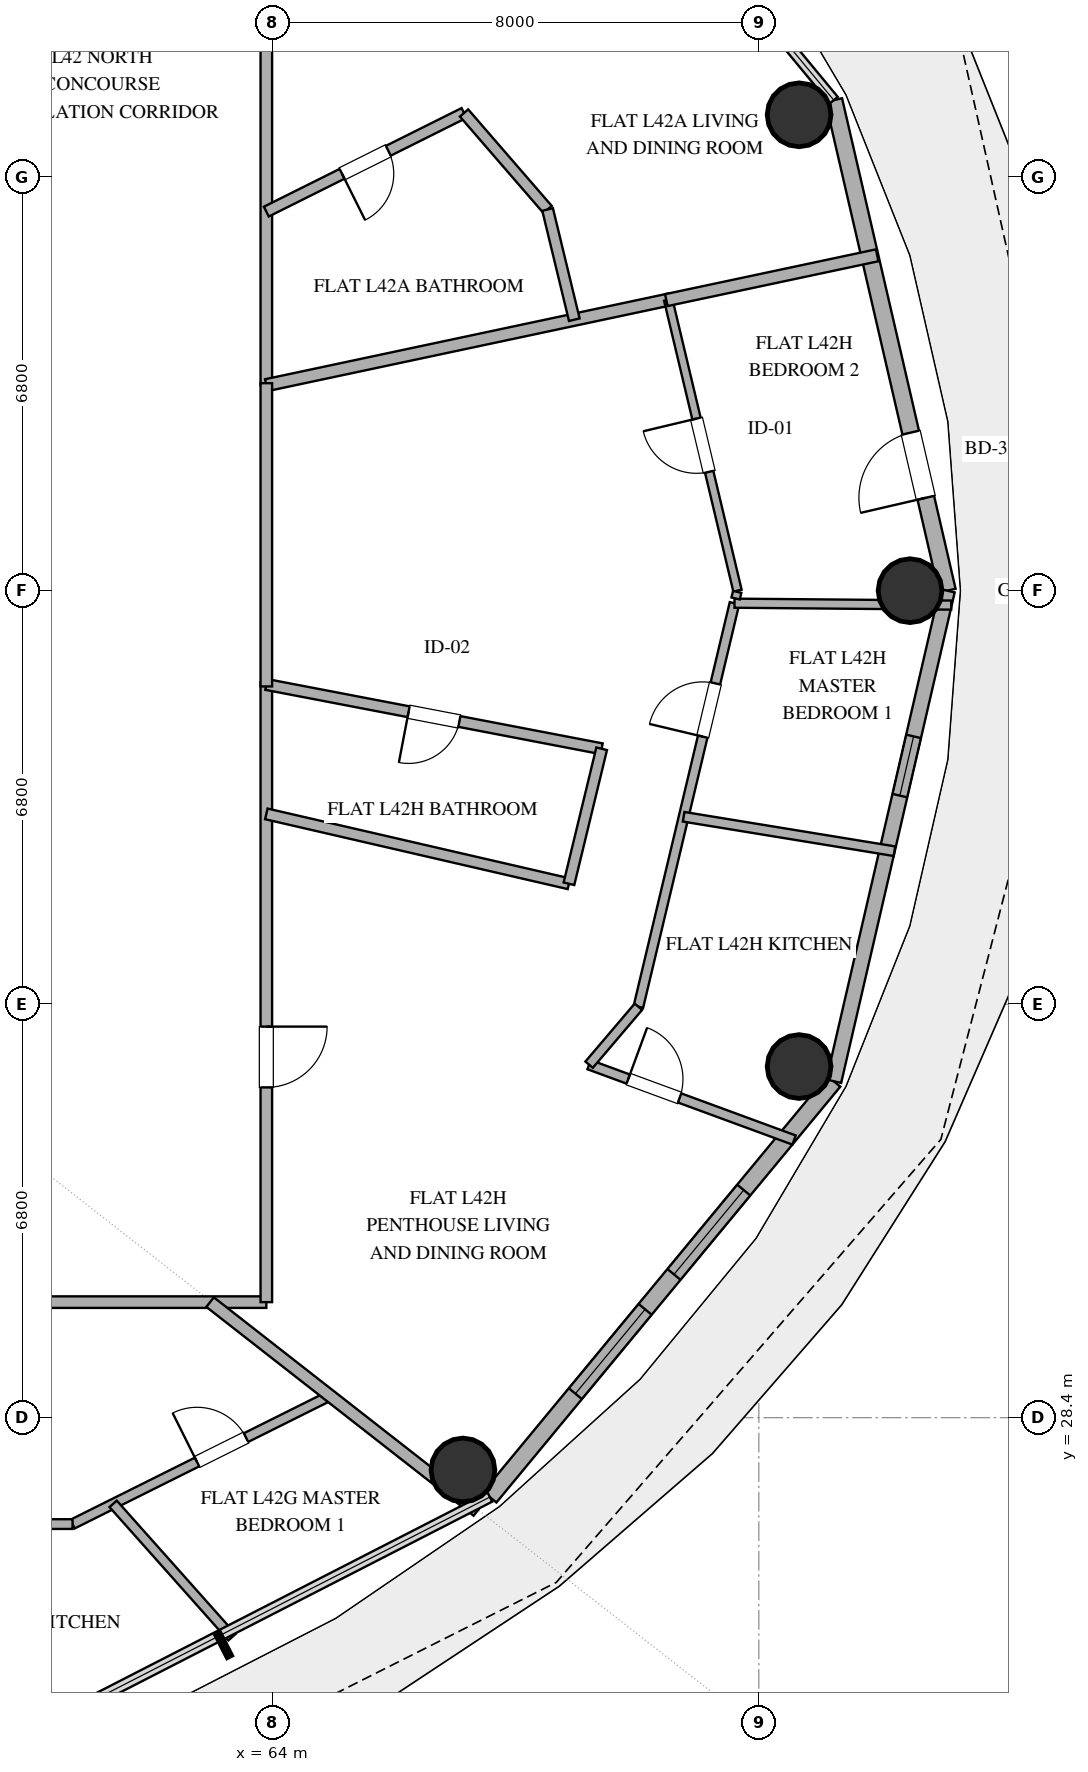
"""IFC4 building model, lengths in metres.
Left out: names, types, materials, properties, quantities, classifications, styles, units other than length and angle.
Written with IfcOpenShell. Run it as: python <this file> out.ifc"""

import sys

from ifc_helpers import new_model, si_unit, direction, frame, frame_2d, origin, origin_2d, place, context, subcontext, project, spatial, rectangle, hollow_circle, extrude, element, fill, save


model = new_model("IFC4")
c1 = context("Model", 3, precision=1e-05, world=origin(), true_north=direction((0.0, 1.0)))
c2 = subcontext(c1, "Body", "Model", "MODEL_VIEW")
j1 = project(units=[si_unit("LENGTHUNIT", "METRE"), si_unit("PLANEANGLEUNIT", "RADIAN")], contexts=[c1])
p1 = place(None, origin())
s1 = spatial("IfcSite", under=j1, at=p1, CompositionType="ELEMENT")
p2 = place(p1, origin())
s2 = spatial("IfcBuilding", under=s1, at=p2, CompositionType="ELEMENT")
p3 = place(p2, frame((0.0, 0.0, 168.6)))
s3 = spatial("IfcBuildingStorey", under=s2, at=p3, CompositionType="ELEMENT", Elevation=168.6)
for number, where, z_axis, x_axis in (
    (1, (74.487, 42.0, 0.0), (0.0, 0.0, 1.0), (1.0, 0.0, 0.0)),
    (2, (72.662, 49.826, 0.0), (0.0, 0.0, 1.0), (1.0, 0.0, 0.0)),
    (3, (67.134, 27.54, 0.0), (0.0, 0.0, 1.0), (1.0, 0.0, 0.0)),
    (4, (72.662, 34.174, 0.0), (0.0, 0.0, 1.0), (1.0, 0.0, 0.0)),
):
    element("IfcColumn", number, at=place(p3, frame(where, z_axis=z_axis, x_axis=x_axis)), inside=s3, PredefinedType="COLUMN", context=c2, shape_type="SweptSolid", body=[
        extrude(hollow_circle(Radius=0.525, WallThickness=0.028, at=origin_2d()), origin(), (0.0, 0.0, 1.0), 3.38),
    ])
p4 = place(p3, frame((75.099, 42.0, 0.0), z_axis=(0.0, 0.0, 1.0), x_axis=(-0.225473184558, 0.974249374157, 0.0)))
e5 = element("IfcWall", 5, at=p4, inside=s3, PredefinedType="SOLIDWALL", context=c2, shape_type="SweptSolid", body=[
    extrude(rectangle(XDim=8.28, YDim=0.28, at=frame_2d((4.14, 0.0))), origin(), (0.0, 0.0, 1.0), 3.38),
])
p5 = place(p4, frame((1.568, 0.0, 0.0)))
e6 = element("IfcOpeningElement", 6, at=p5, cuts=e5, PredefinedType="OPENING", context=c2, shape_type="SweptSolid", body=[
    extrude(rectangle(XDim=1.1, YDim=2.25, at=frame_2d((0.55, 1.125))), frame((0.0, 0.15, 0.0), z_axis=(0.0, -1.0, 0.0), x_axis=(1.0, 0.0, 0.0)), (0.0, 0.0, 1.0), 0.3),
])
p6 = place(p3, frame((67.576, 27.094, 0.0), z_axis=(0.0, 0.0, 1.0), x_axis=(0.637333477683, 0.770588111915, 0.0)))
e7 = element("IfcWall", 7, at=p6, inside=s3, PredefinedType="SOLIDWALL", context=c2, shape_type="SweptSolid", body=[
    extrude(rectangle(XDim=8.875, YDim=0.28, at=frame_2d((4.438, 0.0))), origin(), (0.0, 0.0, 1.0), 3.38),
])
p7 = place(p6, frame((2.207, 0.0, 0.85)))
e8 = element("IfcOpeningElement", 8, at=p7, cuts=e7, PredefinedType="OPENING", context=c2, shape_type="SweptSolid", body=[
    extrude(rectangle(XDim=1.8, YDim=2.2, at=frame_2d((0.9, 1.1))), frame((0.0, 0.15, 0.0), z_axis=(0.0, -1.0, 0.0), x_axis=(1.0, 0.0, 0.0)), (0.0, 0.0, 1.0), 0.3),
])
p8 = place(p6, frame((4.752, 0.0, 0.85)))
e9 = element("IfcOpeningElement", 9, at=p8, cuts=e7, PredefinedType="OPENING", context=c2, shape_type="SweptSolid", body=[
    extrude(rectangle(XDim=1.8, YDim=2.2, at=frame_2d((0.9, 1.1))), frame((0.0, 0.15, 0.0), z_axis=(0.0, -1.0, 0.0), x_axis=(1.0, 0.0, 0.0)), (0.0, 0.0, 1.0), 0.3),
])
p9 = place(p3, frame((73.232, 33.933, 0.0), z_axis=(0.0, 0.0, 1.0), x_axis=(0.225473184558, 0.974249374157, 0.0)))
e10 = element("IfcWall", 10, at=p9, inside=s3, PredefinedType="SOLIDWALL", context=c2, shape_type="SweptSolid", body=[
    extrude(rectangle(XDim=8.28, YDim=0.25, at=frame_2d((4.14, 0.0))), origin(), (0.0, 0.0, 1.0), 3.38),
])
p10 = place(p9, frame((4.821, 0.0, 0.35)))
e11 = element("IfcOpeningElement", 11, at=p10, cuts=e10, PredefinedType="OPENING", context=c2, shape_type="SweptSolid", body=[
    extrude(rectangle(XDim=1.0, YDim=1.05, at=frame_2d((0.5, 0.525))), frame((0.0, 0.135, 0.0), z_axis=(0.0, -1.0, 0.0), x_axis=(1.0, 0.0, 0.0)), (0.0, 0.0, 1.0), 0.27),
])
p11 = place(p3, frame((63.9, 30.3, 0.0), z_axis=(0.0, 0.0, 1.0), x_axis=(-1.0, 0.0, 0.0)))
e12 = element("IfcWall", 12, at=p11, inside=s3, PredefinedType="PARTITIONING", context=c2, shape_type="SweptSolid", body=[
    extrude(rectangle(XDim=15.625, YDim=0.19, at=frame_2d((7.813, 0.0))), origin(), (0.0, 0.0, 1.0), 2.74),
])
p12 = place(p11, frame((6.137, 0.0, 0.0)))
e13 = element("IfcOpeningElement", 13, at=p12, cuts=e12, PredefinedType="OPENING", context=c2, shape_type="SweptSolid", body=[
    extrude(rectangle(XDim=1.0, YDim=2.2, at=frame_2d((0.5, 1.1))), frame((0.0, 0.105, 0.0), z_axis=(0.0, -1.0, 0.0), x_axis=(1.0, 0.0, 0.0)), (0.0, 0.0, 1.0), 0.21),
])
p13 = place(p3, frame((63.9, 40.49, 0.0), z_axis=(0.0, 0.0, 1.0), x_axis=(0.0, -1.0, 0.0)))
e14 = element("IfcWall", 14, at=p13, inside=s3, PredefinedType="PARTITIONING", context=c2, shape_type="SweptSolid", body=[
    extrude(rectangle(XDim=10.19, YDim=0.19, at=frame_2d((5.095, 0.0))), origin(), (0.0, 0.0, 1.0), 2.74),
])
p14 = place(p13, frame((5.659, 0.0, 0.0)))
e15 = element("IfcOpeningElement", 15, at=p14, cuts=e14, PredefinedType="OPENING", context=c2, shape_type="SweptSolid", body=[
    extrude(rectangle(XDim=1.0, YDim=2.2, at=frame_2d((0.5, 1.1))), frame((0.0, 0.105, 0.0), z_axis=(0.0, -1.0, 0.0), x_axis=(1.0, 0.0, 0.0)), (0.0, 0.0, 1.0), 0.21),
])
p15 = place(p3, frame((69.415, 39.4, 0.0), z_axis=(0.0, 0.0, 1.0), x_axis=(-0.98210492306, 0.188334596135, 0.0)))
e16 = element("IfcWall", 16, at=p15, inside=s3, PredefinedType="PLUMBINGWALL", context=c2, shape_type="SweptSolid", body=[
    extrude(rectangle(XDim=5.616, YDim=0.18, at=frame_2d((2.808, 0.0))), origin(), (0.0, 0.0, 1.0), 2.74),
])
p16 = place(p15, frame((2.383, 0.0, 0.0)))
e17 = element("IfcOpeningElement", 17, at=p16, cuts=e16, PredefinedType="OPENING", context=c2, shape_type="SweptSolid", body=[
    extrude(rectangle(XDim=0.85, YDim=2.1, at=frame_2d((0.425, 1.05))), frame((0.0, 0.1, 0.0), z_axis=(0.0, -1.0, 0.0), x_axis=(1.0, 0.0, 0.0)), (0.0, 0.0, 1.0), 0.2),
])
p17 = place(p3, frame((63.9, 53.7, 0.0), z_axis=(0.0, 0.0, 1.0), x_axis=(0.0, -1.0, 0.0)))
e18 = element("IfcWall", 18, at=p17, inside=s3, PredefinedType="PARTITIONING", context=c2, shape_type="SweptSolid", body=[
    extrude(rectangle(XDim=8.32, YDim=0.19, at=frame_2d((4.16, 0.0))), origin(), (0.0, 0.0, 1.0), 2.74),
])
p18 = place(p3, frame((63.9, 45.38, 0.0), z_axis=(0.0, 0.0, 1.0), x_axis=(0.978145779981, 0.207920256603, 0.0)))
e19 = element("IfcWall", 19, at=p18, inside=s3, PredefinedType="PARTITIONING", context=c2, shape_type="SweptSolid", body=[
    extrude(rectangle(XDim=6.789, YDim=0.2, at=frame_2d((3.395, 0.0))), origin(), (0.0, 0.0, 1.0), 2.74),
])
p19 = place(p3, frame((63.9, 38.329, 0.0), z_axis=(0.0, 0.0, 1.0), x_axis=(0.974377500084, -0.224918846098, 0.0)))
e20 = element("IfcWall", 20, at=p19, inside=s3, PredefinedType="PLUMBINGWALL", context=c2, shape_type="SweptSolid", body=[
    extrude(rectangle(XDim=5.108, YDim=0.18, at=frame_2d((2.554, 0.0))), origin(), (0.0, 0.0, 1.0), 2.74),
])
p20 = place(p3, frame((63.9, 45.412, 0.0), z_axis=(0.0, 0.0, 1.0), x_axis=(0.0, -1.0, 0.0)))
e21 = element("IfcWall", 21, at=p20, inside=s3, PredefinedType="PARTITIONING", context=c2, shape_type="SweptSolid", body=[
    extrude(rectangle(XDim=4.987, YDim=0.19, at=frame_2d((2.494, 0.0))), origin(), (0.0, 0.0, 1.0), 2.74),
])
p21 = place(p3, frame((71.649, 42.0, 0.0), z_axis=(0.0, 0.0, 1.0), x_axis=(-0.231622764326, 0.972805682059, 0.0)))
e22 = element("IfcWall", 22, at=p21, inside=s3, PredefinedType="PARTITIONING", context=c2, shape_type="SweptSolid", body=[
    extrude(rectangle(XDim=4.918, YDim=0.14, at=frame_2d((2.459, 0.0))), origin(), (0.0, 0.0, 1.0), 2.74),
])
p22 = place(p21, frame((2.009, 0.0, 0.0)))
e23 = element("IfcOpeningElement", 23, at=p22, cuts=e22, PredefinedType="OPENING", context=c2, shape_type="SweptSolid", body=[
    extrude(rectangle(XDim=0.9, YDim=2.1, at=frame_2d((0.45, 1.05))), frame((0.0, 0.08, 0.0), z_axis=(0.0, -1.0, 0.0), x_axis=(1.0, 0.0, 0.0)), (0.0, 0.0, 1.0), 0.16),
])
p23 = place(p3, frame((60.713, 26.65, 0.0), z_axis=(0.0, 0.0, 1.0), x_axis=(0.894932492822, 0.446201561283, 0.0)))
e24 = element("IfcWall", 24, at=p23, inside=s3, PredefinedType="PLUMBINGWALL", context=c2, shape_type="SweptSolid", body=[
    extrude(rectangle(XDim=4.729, YDim=0.16, at=frame_2d((2.365, 0.0))), origin(), (0.0, 0.0, 1.0), 2.74),
])
p24 = place(p23, frame((2.288, 0.0, 0.0)))
e25 = element("IfcOpeningElement", 25, at=p24, cuts=e24, PredefinedType="OPENING", context=c2, shape_type="SweptSolid", body=[
    extrude(rectangle(XDim=0.9, YDim=2.1, at=frame_2d((0.45, 1.05))), frame((0.0, 0.09, 0.0), z_axis=(0.0, -1.0, 0.0), x_axis=(1.0, 0.0, 0.0)), (0.0, 0.0, 1.0), 0.18),
])
p25 = place(p3, frame((67.152, 49.856, 0.0), z_axis=(0.0, 0.0, 1.0), x_axis=(-0.894843352961, -0.446380301605, 0.0)))
e26 = element("IfcWall", 26, at=p25, inside=s3, PredefinedType="PLUMBINGWALL", context=c2, shape_type="SweptSolid", body=[
    extrude(rectangle(XDim=3.634, YDim=0.18, at=frame_2d((1.817, 0.0))), origin(), (0.0, 0.0, 1.0), 2.74),
])
p26 = place(p25, frame((1.392, 0.0, 0.0)))
e27 = element("IfcOpeningElement", 27, at=p26, cuts=e26, PredefinedType="OPENING", context=c2, shape_type="SweptSolid", body=[
    extrude(rectangle(XDim=0.85, YDim=2.1, at=frame_2d((0.425, 1.05))), frame((0.0, 0.1, 0.0), z_axis=(0.0, -1.0, 0.0), x_axis=(1.0, 0.0, 0.0)), (0.0, 0.0, 1.0), 0.2),
])
p27 = place(p3, frame((70.019, 35.158, 0.0), z_axis=(0.0, 0.0, 1.0), x_axis=(0.231657621012, 0.972797382103, 0.0)))
e28 = element("IfcWall", 28, at=p27, inside=s3, PredefinedType="PLUMBINGWALL", context=c2, shape_type="SweptSolid", body=[
    extrude(rectangle(XDim=6.822, YDim=0.16, at=frame_2d((3.411, 0.0))), origin(), (0.0, 0.0, 1.0), 2.74),
])
p28 = place(p27, frame((4.567, 0.0, 0.0)))
e29 = element("IfcOpeningElement", 29, at=p28, cuts=e28, PredefinedType="OPENING", context=c2, shape_type="SweptSolid", body=[
    extrude(rectangle(XDim=0.9, YDim=2.1, at=frame_2d((0.45, 1.05))), frame((0.0, 0.09, 0.0), z_axis=(0.0, -1.0, 0.0), x_axis=(1.0, 0.0, 0.0)), (0.0, 0.0, 1.0), 0.18),
])
p29 = place(p3, frame((69.208, 34.205, 0.0), z_axis=(0.0, 0.0, 1.0), x_axis=(0.938602834346, -0.344999593272, 0.0)))
e30 = element("IfcWall", 30, at=p29, inside=s3, PredefinedType="PLUMBINGWALL", context=c2, shape_type="SweptSolid", body=[
    extrude(rectangle(XDim=3.591, YDim=0.16, at=frame_2d((1.796, 0.0))), origin(), (0.0, 0.0, 1.0), 2.74),
])
p30 = place(p29, frame((0.686, 0.0, 0.0)))
e31 = element("IfcOpeningElement", 31, at=p30, cuts=e30, PredefinedType="OPENING", context=c2, shape_type="SweptSolid", body=[
    extrude(rectangle(XDim=0.9, YDim=2.1, at=frame_2d((0.45, 1.05))), frame((0.0, 0.09, 0.0), z_axis=(0.0, -1.0, 0.0), x_axis=(1.0, 0.0, 0.0)), (0.0, 0.0, 1.0), 0.18),
])
p31 = place(p3, frame((75.165, 41.763, 0.0), z_axis=(0.0, 0.0, 1.0), x_axis=(-0.999962184605, 0.00869651424, 0.0)))
e32 = element("IfcWall", 32, at=p31, inside=s3, PredefinedType="PARTITIONING", context=c2, shape_type="SweptSolid", body=[
    extrude(rectangle(XDim=3.565, YDim=0.15, at=frame_2d((1.783, 0.0))), origin(), (0.0, 0.0, 1.0), 2.74),
])
p32 = place(p3, frame((73.946, 47.515, 0.0), z_axis=(0.0, 0.0, 1.0), x_axis=(-0.978135742848, -0.207967469966, 0.0)))
e33 = element("IfcWall", 33, at=p32, inside=s3, PredefinedType="PARTITIONING", context=c2, shape_type="SweptSolid", body=[
    extrude(rectangle(XDim=3.545, YDim=0.2, at=frame_2d((1.773, 0.0))), origin(), (0.0, 0.0, 1.0), 2.74),
])
p33 = place(p3, frame((74.231, 37.716, 0.0), z_axis=(0.0, 0.0, 1.0), x_axis=(-0.986918442879, 0.161220306117, 0.0)))
e34 = element("IfcWall", 34, at=p33, inside=s3, PredefinedType="PLUMBINGWALL", context=c2, shape_type="SweptSolid", body=[
    extrude(rectangle(XDim=3.513, YDim=0.16, at=frame_2d((1.757, 0.0))), origin(), (0.0, 0.0, 1.0), 2.74),
])
p34 = place(p3, frame((67.37, 26.866, 0.0), z_axis=(0.0, 0.0, 1.0), x_axis=(-0.788004464355, 0.615669525117, 0.0)))
e35 = element("IfcWall", 35, at=p34, inside=s3, PredefinedType="PARTITIONING", context=c2, shape_type="SweptSolid", body=[
    extrude(rectangle(XDim=5.577, YDim=0.2, at=frame_2d((2.789, 0.0))), origin(), (0.0, 0.0, 1.0), 2.74),
])
p35 = place(p3, frame((63.335, 24.79, 0.0), z_axis=(0.0, 0.0, 1.0), x_axis=(-0.665255741341, 0.746615562799, 0.0)))
e36 = element("IfcWall", 36, at=p35, inside=s3, PredefinedType="PLUMBINGWALL", context=c2, shape_type="SweptSolid", body=[
    extrude(rectangle(XDim=2.938, YDim=0.16, at=frame_2d((1.469, 0.0))), origin(), (0.0, 0.0, 1.0), 2.74),
])
p36 = place(p3, frame((68.877, 37.18, 0.0), z_axis=(0.0, 0.0, 1.0), x_axis=(0.235462364404, 0.971883467783, 0.0)))
e37 = element("IfcWall", 37, at=p36, inside=s3, PredefinedType="PLUMBINGWALL", context=c2, shape_type="SweptSolid", body=[
    extrude(rectangle(XDim=2.284, YDim=0.18, at=frame_2d((1.142, 0.0))), origin(), (0.0, 0.0, 1.0), 2.74),
])
p37 = place(p3, frame((68.526, 48.268, 0.0), z_axis=(0.0, 0.0, 1.0), x_axis=(-0.654594060889, 0.755980565524, 0.0)))
e38 = element("IfcWall", 38, at=p37, inside=s3, PredefinedType="PLUMBINGWALL", context=c2, shape_type="SweptSolid", body=[
    extrude(rectangle(XDim=2.1, YDim=0.18, at=frame_2d((1.05, 0.0))), origin(), (0.0, 0.0, 1.0), 2.74),
])
p38 = place(p3, frame((68.965, 46.456, 0.0), z_axis=(0.0, 0.0, 1.0), x_axis=(-0.235442613623, 0.971888252676, 0.0)))
e39 = element("IfcWall", 39, at=p38, inside=s3, PredefinedType="PLUMBINGWALL", context=c2, shape_type="SweptSolid", body=[
    extrude(rectangle(XDim=1.865, YDim=0.18, at=frame_2d((0.932, 0.0))), origin(), (0.0, 0.0, 1.0), 2.74),
])
p39 = place(p3, frame((70.02, 35.158, 0.0), z_axis=(0.0, 0.0, 1.0), x_axis=(-0.648152333742, -0.761510703972, 0.0)))
e40 = element("IfcWall", 40, at=p39, inside=s3, PredefinedType="PLUMBINGWALL", context=c2, shape_type="SweptSolid", body=[
    extrude(rectangle(XDim=1.251, YDim=0.16, at=frame_2d((0.625, 0.0))), origin(), (0.0, 0.0, 1.0), 2.74),
])
p40 = place(p3, frame((60.713, 26.65, 0.0), z_axis=(0.0, 0.0, 1.0), x_axis=(-1.0, 0.0, 0.0)))
e41 = element("IfcWall", 41, at=p40, inside=s3, PredefinedType="PLUMBINGWALL", context=c2, shape_type="SweptSolid", body=[
    extrude(rectangle(XDim=1.062, YDim=0.16, at=frame_2d((0.531, 0.0))), origin(), (0.0, 0.0, 1.0), 2.74),
])
p41 = place(p3, frame((71.618, 41.872, 0.0), z_axis=(0.0, 0.0, 1.0), x_axis=(0.233786115402, 0.972288050037, 0.0)))
e42 = element("IfcWall", 42, at=p41, inside=s3, PredefinedType="PARTITIONING", context=c2, shape_type="SweptSolid", body=[
    extrude(rectangle(XDim=0.112, YDim=0.14, at=frame_2d((0.056, 0.0))), origin(), (0.0, 0.0, 1.0), 2.74),
])
p42 = place(p5, origin())
e43 = element("IfcDoor", 43, at=p42, inside=s3, OperationType="SINGLE_SWING_LEFT", PredefinedType="DOOR", context=c2, shape_type="SweptSolid", body=[
    extrude(rectangle(XDim=1.1, YDim=2.25, at=frame_2d((0.55, 1.125))), frame((0.0, 0.025, 0.0), z_axis=(0.0, -1.0, 0.0), x_axis=(1.0, 0.0, 0.0)), (0.0, 0.0, 1.0), 0.05),
])
fill(e6, e43)
p43 = place(p7, origin())
e44 = element("IfcWindow", 44, at=p43, inside=s3, PartitioningType="SINGLE_PANEL", PredefinedType="WINDOW", context=c2, shape_type="SweptSolid", body=[
    extrude(rectangle(XDim=1.8, YDim=2.2, at=frame_2d((0.9, 1.1))), frame((0.0, 0.03, 0.0), z_axis=(0.0, -1.0, 0.0), x_axis=(1.0, 0.0, 0.0)), (0.0, 0.0, 1.0), 0.06),
])
fill(e8, e44)
p44 = place(p8, origin())
e45 = element("IfcWindow", 45, at=p44, inside=s3, PartitioningType="SINGLE_PANEL", PredefinedType="WINDOW", context=c2, shape_type="SweptSolid", body=[
    extrude(rectangle(XDim=1.8, YDim=2.2, at=frame_2d((0.9, 1.1))), frame((0.0, 0.03, 0.0), z_axis=(0.0, -1.0, 0.0), x_axis=(1.0, 0.0, 0.0)), (0.0, 0.0, 1.0), 0.06),
])
fill(e9, e45)
p45 = place(p10, origin())
e46 = element("IfcWindow", 46, at=p45, inside=s3, PartitioningType="SINGLE_PANEL", PredefinedType="WINDOW", context=c2, shape_type="SweptSolid", body=[
    extrude(rectangle(XDim=1.0, YDim=1.05, at=frame_2d((0.5, 0.525))), frame((0.0, 0.03, 0.0), z_axis=(0.0, -1.0, 0.0), x_axis=(1.0, 0.0, 0.0)), (0.0, 0.0, 1.0), 0.06),
])
fill(e11, e46)
p46 = place(p14, origin())
e47 = element("IfcDoor", 47, at=p46, inside=s3, OperationType="SINGLE_SWING_LEFT", PredefinedType="DOOR", context=c2, shape_type="SweptSolid", body=[
    extrude(rectangle(XDim=1.0, YDim=2.2, at=frame_2d((0.5, 1.1))), frame((0.0, 0.025, 0.0), z_axis=(0.0, -1.0, 0.0), x_axis=(1.0, 0.0, 0.0)), (0.0, 0.0, 1.0), 0.05),
])
fill(e15, e47)
p47 = place(p16, origin())
e48 = element("IfcDoor", 48, at=p47, inside=s3, OperationType="SINGLE_SWING_RIGHT", PredefinedType="DOOR", context=c2, shape_type="SweptSolid", body=[
    extrude(rectangle(XDim=0.85, YDim=2.1, at=frame_2d((0.425, 1.05))), frame((0.0, 0.025, 0.0), z_axis=(0.0, -1.0, 0.0), x_axis=(1.0, 0.0, 0.0)), (0.0, 0.0, 1.0), 0.05),
])
fill(e17, e48)
p48 = place(p22, origin())
e49 = element("IfcDoor", 49, at=p48, inside=s3, OperationType="SINGLE_SWING_RIGHT", PredefinedType="DOOR", context=c2, shape_type="SweptSolid", body=[
    extrude(rectangle(XDim=0.9, YDim=2.1, at=frame_2d((0.45, 1.05))), frame((0.0, 0.025, 0.0), z_axis=(0.0, -1.0, 0.0), x_axis=(1.0, 0.0, 0.0)), (0.0, 0.0, 1.0), 0.05),
])
fill(e23, e49)
p49 = place(p24, origin())
e50 = element("IfcDoor", 50, at=p49, inside=s3, OperationType="SINGLE_SWING_LEFT", PredefinedType="DOOR", context=c2, shape_type="SweptSolid", body=[
    extrude(rectangle(XDim=0.9, YDim=2.1, at=frame_2d((0.45, 1.05))), frame((0.0, 0.025, 0.0), z_axis=(0.0, -1.0, 0.0), x_axis=(1.0, 0.0, 0.0)), (0.0, 0.0, 1.0), 0.05),
])
fill(e25, e50)
p50 = place(p26, origin())
e51 = element("IfcDoor", 51, at=p50, inside=s3, OperationType="SINGLE_SWING_RIGHT", PredefinedType="DOOR", context=c2, shape_type="SweptSolid", body=[
    extrude(rectangle(XDim=0.85, YDim=2.1, at=frame_2d((0.425, 1.05))), frame((0.0, 0.025, 0.0), z_axis=(0.0, -1.0, 0.0), x_axis=(1.0, 0.0, 0.0)), (0.0, 0.0, 1.0), 0.05),
])
fill(e27, e51)
p51 = place(p28, origin())
e52 = element("IfcDoor", 52, at=p51, inside=s3, OperationType="SINGLE_SWING_LEFT", PredefinedType="DOOR", context=c2, shape_type="SweptSolid", body=[
    extrude(rectangle(XDim=0.9, YDim=2.1, at=frame_2d((0.45, 1.05))), frame((0.0, 0.025, 0.0), z_axis=(0.0, -1.0, 0.0), x_axis=(1.0, 0.0, 0.0)), (0.0, 0.0, 1.0), 0.05),
])
fill(e29, e52)
p52 = place(p30, origin())
e53 = element("IfcDoor", 53, at=p52, inside=s3, OperationType="SINGLE_SWING_LEFT", PredefinedType="DOOR", context=c2, shape_type="SweptSolid", body=[
    extrude(rectangle(XDim=0.9, YDim=2.1, at=frame_2d((0.45, 1.05))), frame((0.0, 0.025, 0.0), z_axis=(0.0, -1.0, 0.0), x_axis=(1.0, 0.0, 0.0)), (0.0, 0.0, 1.0), 0.05),
])
fill(e31, e53)
save(model, sys.argv[1])
